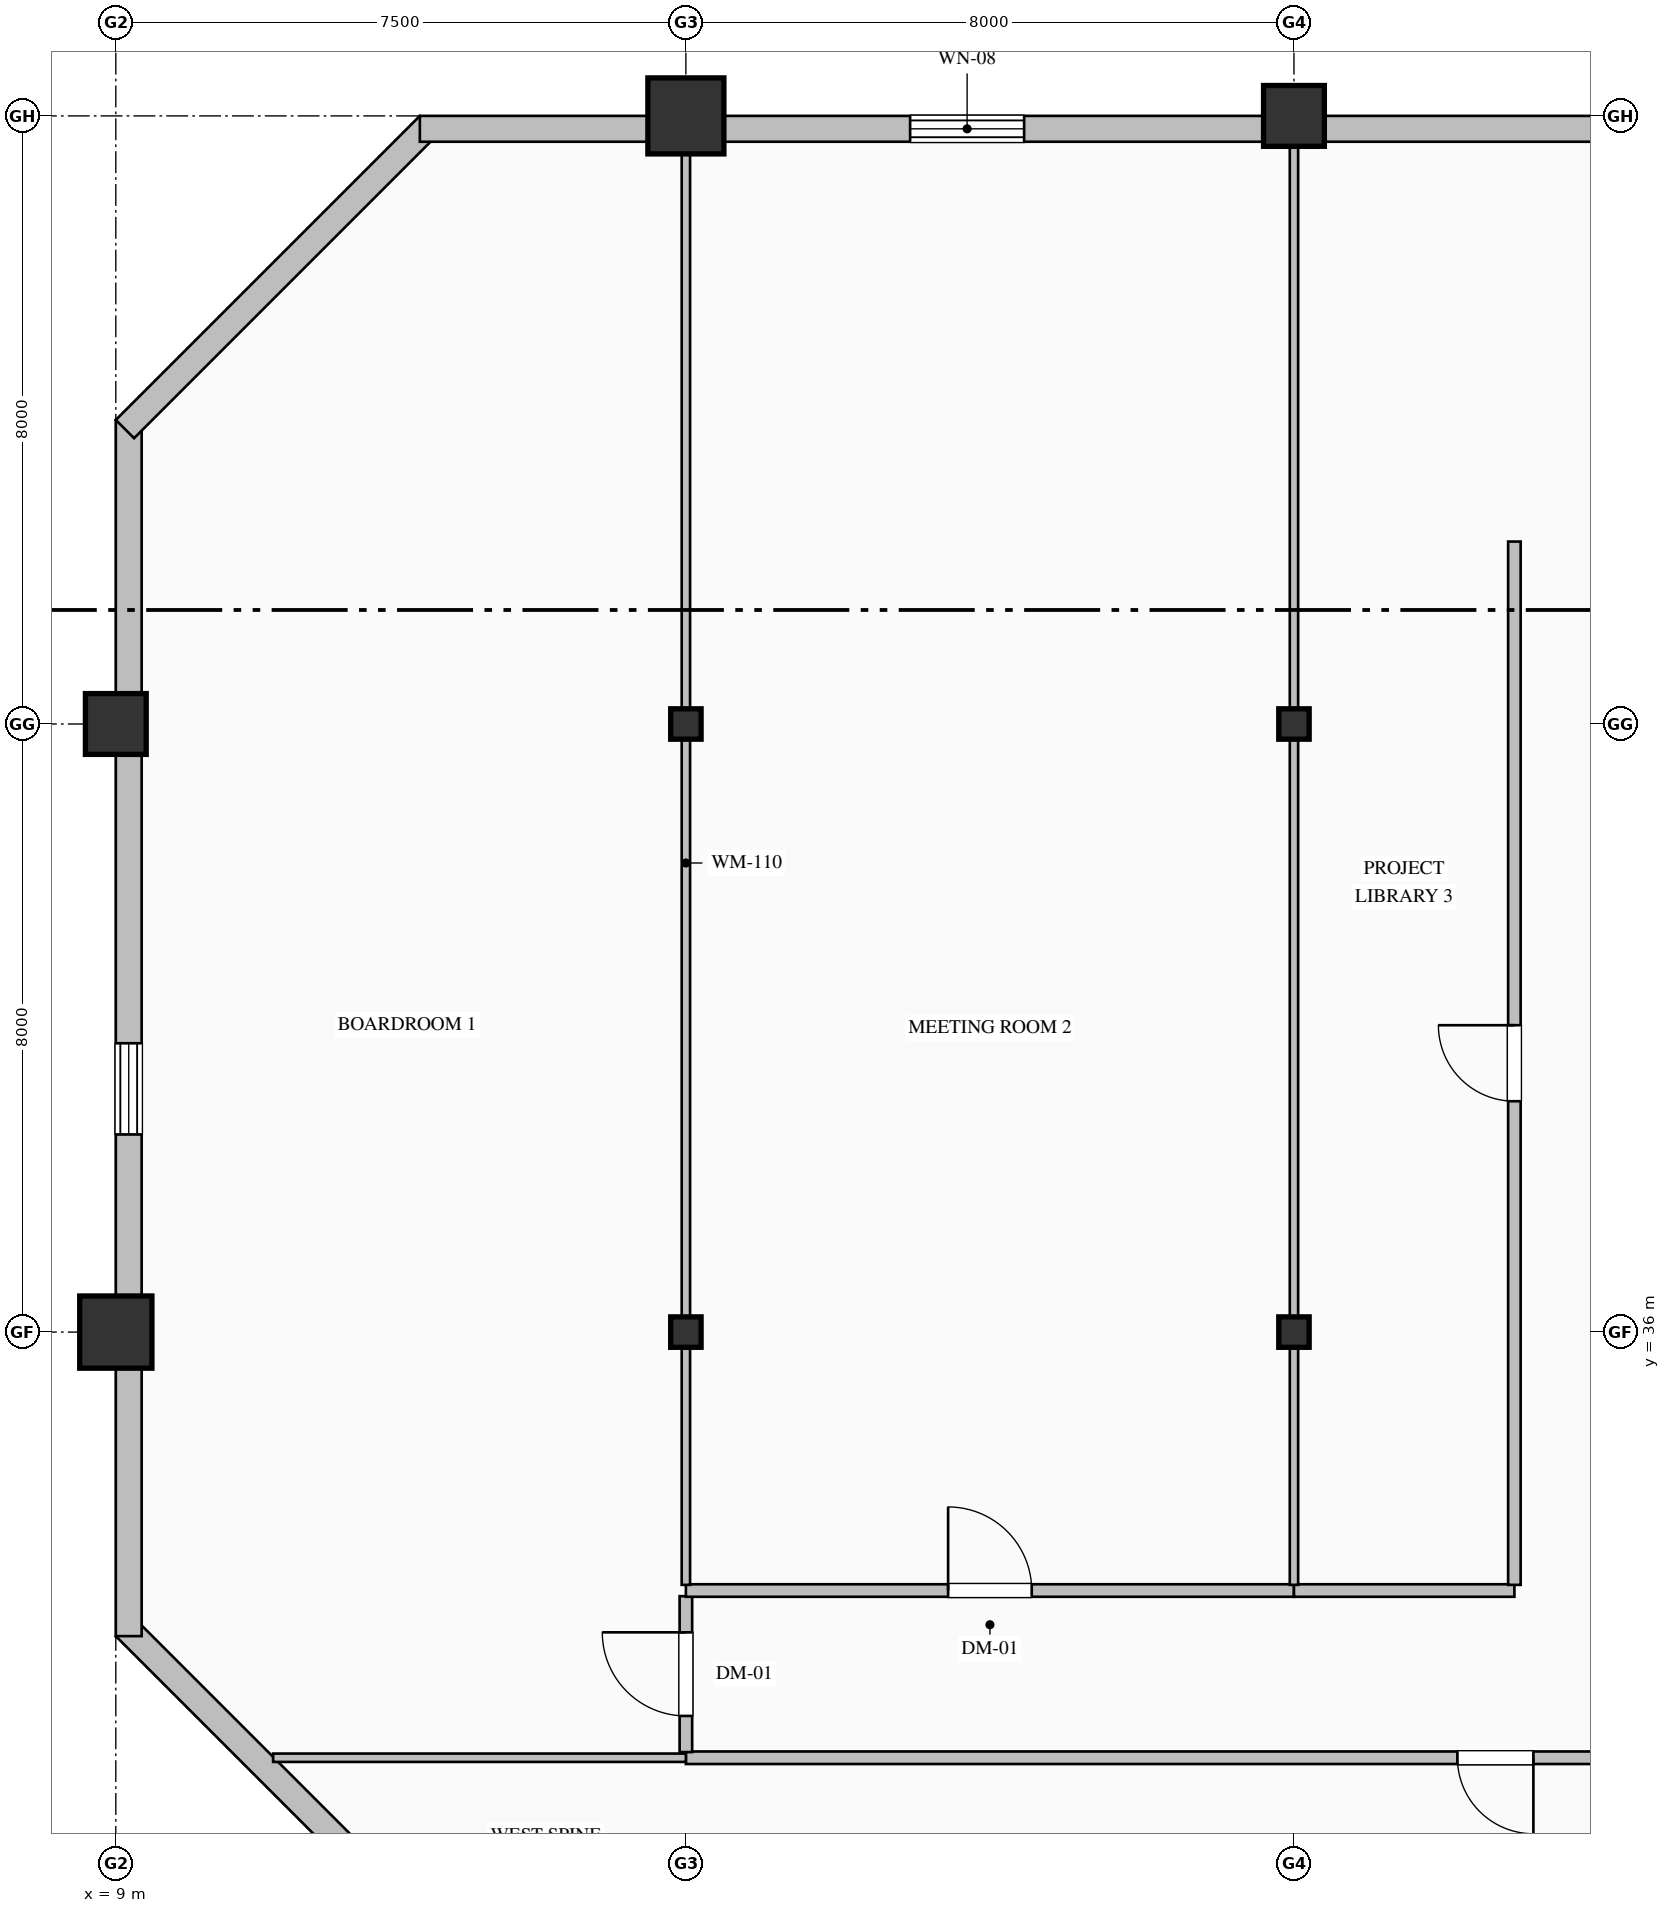
"""IFC4 building model, lengths in metres.
Left out: names, types, materials, properties, quantities, classifications, styles, units other than length and angle.
Written with IfcOpenShell. Run it as: python <this file> out.ifc"""

import sys

from ifc_helpers import new_model, si_unit, direction, frame, frame_2d, origin, origin_2d, place, context, subcontext, project, spatial, rectangle, hollow_rectangle, hollow_circle, i_section, extrude, element, fill, save


model = new_model("IFC4")
c1 = context("Model", 3, precision=1e-05, world=origin(), true_north=direction((0.0, 1.0)))
c2 = subcontext(c1, "Body", "Model", "MODEL_VIEW")
j1 = project(units=[si_unit("LENGTHUNIT", "METRE"), si_unit("PLANEANGLEUNIT", "RADIAN")], contexts=[c1])
p1 = place(None, origin())
s1 = spatial("IfcSite", under=j1, at=p1, CompositionType="ELEMENT")
p2 = place(p1, origin())
s2 = spatial("IfcBuilding", under=s1, at=p2, CompositionType="ELEMENT")
p3 = place(p2, frame((0.0, 0.0, 221.8)))
s3 = spatial("IfcBuildingStorey", under=s2, at=p3, CompositionType="ELEMENT", Elevation=221.8)
p4 = place(p3, frame((9.0, 36.0, 0.0), z_axis=(0.0, 0.0, 1.0), x_axis=(1.0, 0.0, 0.0)))
e1 = element("IfcColumn", 1, at=p4, inside=s3, PredefinedType="COLUMN", context=c2, shape_type="SweptSolid", body=[
    extrude(hollow_rectangle(XDim=0.95, YDim=0.95, WallThickness=0.036, at=origin_2d()), origin(), (0.0, 0.0, 1.0), 4.0),
])
p5 = place(p3, frame((9.0, 44.0, 0.0), z_axis=(0.0, 0.0, 1.0), x_axis=(1.0, 0.0, 0.0)))
e2 = element("IfcColumn", 2, at=p5, inside=s3, PredefinedType="COLUMN", context=c2, shape_type="SweptSolid", body=[
    extrude(hollow_rectangle(XDim=0.8, YDim=0.8, WallThickness=0.032, at=origin_2d()), origin(), (0.0, 0.0, 1.0), 4.0),
])
for number, where, z_axis, x_axis in (
    (3, (16.5, 36.0, 0.0), (0.0, 0.0, 1.0), (1.0, 0.0, 0.0)),
    (4, (16.5, 44.0, 0.0), (0.0, 0.0, 1.0), (1.0, 0.0, 0.0)),
):
    element("IfcColumn", number, at=place(p3, frame(where, z_axis=z_axis, x_axis=x_axis)), inside=s3, PredefinedType="COLUMN", context=c2, shape_type="SweptSolid", body=[
        extrude(i_section(OverallWidth=0.4, OverallDepth=0.4, WebThickness=0.013, FlangeThickness=0.021, FilletRadius=0.022, at=origin_2d()), origin(), (0.0, 0.0, 1.0), 4.0),
    ])
p6 = place(p3, frame((16.5, 52.0, 0.0), z_axis=(0.0, 0.0, 1.0), x_axis=(1.0, 0.0, 0.0)))
e5 = element("IfcColumn", 5, at=p6, inside=s3, PredefinedType="COLUMN", context=c2, shape_type="SweptSolid", body=[
    extrude(hollow_circle(Radius=0.5, WallThickness=0.036, at=origin_2d()), origin(), (0.0, 0.0, 1.0), 4.0),
])
for number, where, z_axis, x_axis in (
    (6, (24.5, 36.0, 0.0), (0.0, 0.0, 1.0), (1.0, 0.0, 0.0)),
    (7, (24.5, 44.0, 0.0), (0.0, 0.0, 1.0), (1.0, 0.0, 0.0)),
):
    element("IfcColumn", number, at=place(p3, frame(where, z_axis=z_axis, x_axis=x_axis)), inside=s3, PredefinedType="COLUMN", context=c2, shape_type="SweptSolid", body=[
        extrude(i_section(OverallWidth=0.4, OverallDepth=0.4, WebThickness=0.013, FlangeThickness=0.021, FilletRadius=0.022, at=origin_2d()), origin(), (0.0, 0.0, 1.0), 4.0),
    ])
p7 = place(p3, frame((24.5, 52.0, 0.0), z_axis=(0.0, 0.0, 1.0), x_axis=(1.0, 0.0, 0.0)))
e8 = element("IfcColumn", 8, at=p7, inside=s3, PredefinedType="COLUMN", context=c2, shape_type="SweptSolid", body=[
    extrude(hollow_rectangle(XDim=0.8, YDim=0.8, WallThickness=0.032, at=origin_2d()), origin(), (0.0, 0.0, 1.0), 4.0),
])
p8 = place(p3, frame((13.12, 28.12, 0.0), z_axis=(0.0, 0.0, 1.0), x_axis=(-0.707106781187, 0.707106781187, 0.0)))
e9 = element("IfcWall", 9, at=p8, inside=s3, PredefinedType="SOLIDWALL", context=c2, shape_type="SweptSolid", body=[
    extrude(rectangle(XDim=5.657, YDim=0.34, at=frame_2d((2.828, 0.0))), origin(), (0.0, 0.0, 1.0), 3.775),
])
p9 = place(p3, frame((9.17, 32.0, 0.0), z_axis=(0.0, 0.0, 1.0), x_axis=(0.0, 1.0, 0.0)))
e10 = element("IfcWall", 10, at=p9, inside=s3, PredefinedType="SOLIDWALL", context=c2, shape_type="SweptSolid", body=[
    extrude(rectangle(XDim=16.0, YDim=0.34, at=frame_2d((8.0, 0.0))), origin(), (0.0, 0.0, 1.0), 3.325),
])
p10 = place(p9, frame((6.6, 0.0, 0.9)))
e11 = element("IfcOpeningElement", 11, at=p10, cuts=e10, PredefinedType="OPENING", context=c2, shape_type="SweptSolid", body=[
    extrude(rectangle(XDim=1.2, YDim=1.85, at=frame_2d((0.6, 0.925))), frame((0.0, 0.18, 0.0), z_axis=(0.0, -1.0, 0.0), x_axis=(1.0, 0.0, 0.0)), (0.0, 0.0, 1.0), 0.36),
])
p11 = place(p3, frame((9.12, 47.88, 0.0), z_axis=(0.0, 0.0, 1.0), x_axis=(0.707106781187, 0.707106781187, 0.0)))
e12 = element("IfcWall", 12, at=p11, inside=s3, PredefinedType="SOLIDWALL", context=c2, shape_type="SweptSolid", body=[
    extrude(rectangle(XDim=5.657, YDim=0.34, at=frame_2d((2.828, 0.0))), origin(), (0.0, 0.0, 1.0), 3.775),
])
p12 = place(p3, frame((13.0, 51.83, 0.0), z_axis=(0.0, 0.0, 1.0), x_axis=(1.0, 0.0, 0.0)))
e13 = element("IfcWall", 13, at=p12, inside=s3, PredefinedType="SOLIDWALL", context=c2, shape_type="SweptSolid", body=[
    extrude(rectangle(XDim=27.52, YDim=0.34, at=frame_2d((13.76, 0.0))), origin(), (0.0, 0.0, 1.0), 3.325),
])
p13 = place(p12, frame((6.45, 0.0, 0.7)))
e14 = element("IfcOpeningElement", 14, at=p13, cuts=e13, PredefinedType="OPENING", context=c2, shape_type="SweptSolid", body=[
    extrude(rectangle(XDim=1.5, YDim=2.4, at=frame_2d((0.75, 1.2))), frame((0.0, 0.18, 0.0), z_axis=(0.0, -1.0, 0.0), x_axis=(1.0, 0.0, 0.0)), (0.0, 0.0, 1.0), 0.36),
])
p14 = place(p3, frame((37.8, 30.4, 0.0), z_axis=(0.0, 0.0, 1.0), x_axis=(-1.0, 0.0, 0.0)))
e15 = element("IfcWall", 15, at=p14, inside=s3, PredefinedType="PARTITIONING", context=c2, shape_type="SweptSolid", body=[
    extrude(rectangle(XDim=21.3, YDim=0.165, at=frame_2d((10.65, 0.0))), origin(), (0.0, 0.0, 1.0), 3.775),
])
p15 = place(p14, frame((10.15, 0.0, 0.0)))
e16 = element("IfcOpeningElement", 16, at=p15, cuts=e15, PredefinedType="OPENING", context=c2, shape_type="SweptSolid", body=[
    extrude(rectangle(XDim=1.0, YDim=2.15, at=frame_2d((0.5, 1.075))), frame((0.0, 0.093, 0.0), z_axis=(0.0, -1.0, 0.0), x_axis=(1.0, 0.0, 0.0)), (0.0, 0.0, 1.0), 0.185),
])
p16 = place(p3, frame((16.5, 30.475, 0.0), z_axis=(0.0, 0.0, 1.0), x_axis=(0.0, 1.0, 0.0)))
e17 = element("IfcWall", 17, at=p16, inside=s3, PredefinedType="PARTITIONING", context=c2, shape_type="SweptSolid", body=[
    extrude(rectangle(XDim=2.051, YDim=0.165, at=frame_2d((1.025, 0.0))), origin(), (0.0, 0.0, 1.0), 3.179),
])
p17 = place(p16, frame((0.476, 0.0, 0.0)))
e18 = element("IfcOpeningElement", 18, at=p17, cuts=e17, PredefinedType="OPENING", context=c2, shape_type="SweptSolid", body=[
    extrude(rectangle(XDim=1.1, YDim=2.2, at=frame_2d((0.55, 1.1))), frame((0.0, 0.093, 0.0), z_axis=(0.0, -1.0, 0.0), x_axis=(1.0, 0.0, 0.0)), (0.0, 0.0, 1.0), 0.185),
])
p18 = place(p3, frame((16.5, 32.6, 0.0), z_axis=(0.0, 0.0, 1.0), x_axis=(1.0, 0.0, 0.0)))
e19 = element("IfcWall", 19, at=p18, inside=s3, PredefinedType="PARTITIONING", context=c2, shape_type="SweptSolid", body=[
    extrude(rectangle(XDim=8.0, YDim=0.165, at=frame_2d((4.0, 0.0))), origin(), (0.0, 0.0, 1.0), 3.775),
])
p19 = place(p18, frame((3.45, 0.0, 0.0)))
e20 = element("IfcOpeningElement", 20, at=p19, cuts=e19, PredefinedType="OPENING", context=c2, shape_type="SweptSolid", body=[
    extrude(rectangle(XDim=1.1, YDim=2.2, at=frame_2d((0.55, 1.1))), frame((0.0, 0.093, 0.0), z_axis=(0.0, -1.0, 0.0), x_axis=(1.0, 0.0, 0.0)), (0.0, 0.0, 1.0), 0.185),
])
p20 = place(p3, frame((24.5, 32.6, 0.0), z_axis=(0.0, 0.0, 1.0), x_axis=(1.0, 0.0, 0.0)))
e21 = element("IfcWall", 21, at=p20, inside=s3, PredefinedType="PARTITIONING", context=c2, shape_type="SweptSolid", body=[
    extrude(rectangle(XDim=2.9, YDim=0.165, at=frame_2d((1.45, 0.0))), origin(), (0.0, 0.0, 1.0), 3.775),
])
p21 = place(p3, frame((27.4, 32.675, 0.0), z_axis=(0.0, 0.0, 1.0), x_axis=(0.0, 1.0, 0.0)))
e22 = element("IfcWall", 22, at=p21, inside=s3, PredefinedType="PARTITIONING", context=c2, shape_type="SweptSolid", body=[
    extrude(rectangle(XDim=13.725, YDim=0.165, at=frame_2d((6.863, 0.0))), origin(), (0.0, 0.0, 1.0), 3.775),
])
p22 = place(p21, frame((6.363, 0.0, 0.0)))
e23 = element("IfcOpeningElement", 23, at=p22, cuts=e22, PredefinedType="OPENING", context=c2, shape_type="SweptSolid", body=[
    extrude(rectangle(XDim=1.0, YDim=2.15, at=frame_2d((0.5, 1.075))), frame((0.0, 0.093, 0.0), z_axis=(0.0, -1.0, 0.0), x_axis=(1.0, 0.0, 0.0)), (0.0, 0.0, 1.0), 0.185),
])
p23 = place(p3, frame((11.07, 30.4, 0.0), z_axis=(0.0, 0.0, 1.0), x_axis=(1.0, 0.0, 0.0)))
e24 = element("IfcWall", 24, at=p23, inside=s3, PredefinedType="MOVABLE", context=c2, shape_type="SweptSolid", body=[
    extrude(rectangle(XDim=5.43, YDim=0.11, at=frame_2d((2.715, 0.0))), origin(), (0.0, 0.0, 1.0), 3.775),
])
for number, where, z_axis, x_axis in (
    (25, (16.5, 51.668, 0.0), (0.0, 0.0, 1.0), (0.0, -1.0, 0.0)),
    (26, (24.5, 51.668, 0.0), (0.0, 0.0, 1.0), (0.0, -1.0, 0.0)),
):
    element("IfcWall", number, at=place(p3, frame(where, z_axis=z_axis, x_axis=x_axis)), inside=s3, PredefinedType="MOVABLE", context=c2, shape_type="SweptSolid", body=[
        extrude(rectangle(XDim=18.993, YDim=0.11, at=frame_2d((9.497, 0.0))), origin(), (0.0, 0.0, 1.0), 3.179),
    ])
p24 = place(p10, origin())
e27 = element("IfcWindow", 27, at=p24, inside=s3, PartitioningType="DOUBLE_PANEL_VERTICAL", PredefinedType="WINDOW", context=c2, shape_type="SweptSolid", body=[
    extrude(rectangle(XDim=1.2, YDim=1.85, at=frame_2d((0.6, 0.925))), frame((0.0, 0.15, 0.0), z_axis=(0.0, -1.0, 0.0), x_axis=(1.0, 0.0, 0.0)), (0.0, 0.0, 1.0), 0.06),
])
fill(e11, e27)
p25 = place(p13, origin())
e28 = element("IfcWindow", 28, at=p25, inside=s3, PartitioningType="DOUBLE_PANEL_HORIZONTAL", PredefinedType="WINDOW", context=c2, shape_type="SweptSolid", body=[
    extrude(rectangle(XDim=1.5, YDim=2.4, at=frame_2d((0.75, 1.2))), frame((0.0, 0.15, 0.0), z_axis=(0.0, -1.0, 0.0), x_axis=(1.0, 0.0, 0.0)), (0.0, 0.0, 1.0), 0.06),
])
fill(e14, e28)
p26 = place(p15, origin())
e29 = element("IfcDoor", 29, at=p26, inside=s3, OperationType="SINGLE_SWING_LEFT", PredefinedType="DOOR", context=c2, shape_type="SweptSolid", body=[
    extrude(rectangle(XDim=1.0, YDim=2.15, at=frame_2d((0.5, 1.075))), frame((0.0, 0.025, 0.0), z_axis=(0.0, -1.0, 0.0), x_axis=(1.0, 0.0, 0.0)), (0.0, 0.0, 1.0), 0.05),
])
fill(e16, e29)
p27 = place(p17, origin())
e30 = element("IfcDoor", 30, at=p27, inside=s3, OperationType="SINGLE_SWING_RIGHT", PredefinedType="DOOR", context=c2, shape_type="SweptSolid", body=[
    extrude(rectangle(XDim=1.1, YDim=2.2, at=frame_2d((0.55, 1.1))), frame((0.0, 0.025, 0.0), z_axis=(0.0, -1.0, 0.0), x_axis=(1.0, 0.0, 0.0)), (0.0, 0.0, 1.0), 0.05),
])
fill(e18, e30)
p28 = place(p19, origin())
e31 = element("IfcDoor", 31, at=p28, inside=s3, OperationType="SINGLE_SWING_LEFT", PredefinedType="DOOR", context=c2, shape_type="SweptSolid", body=[
    extrude(rectangle(XDim=1.1, YDim=2.2, at=frame_2d((0.55, 1.1))), frame((0.0, 0.025, 0.0), z_axis=(0.0, -1.0, 0.0), x_axis=(1.0, 0.0, 0.0)), (0.0, 0.0, 1.0), 0.05),
])
fill(e20, e31)
p29 = place(p22, origin())
e32 = element("IfcDoor", 32, at=p29, inside=s3, OperationType="SINGLE_SWING_RIGHT", PredefinedType="DOOR", context=c2, shape_type="SweptSolid", body=[
    extrude(rectangle(XDim=1.0, YDim=2.15, at=frame_2d((0.5, 1.075))), frame((0.0, 0.025, 0.0), z_axis=(0.0, -1.0, 0.0), x_axis=(1.0, 0.0, 0.0)), (0.0, 0.0, 1.0), 0.05),
])
fill(e23, e32)
save(model, sys.argv[1])
